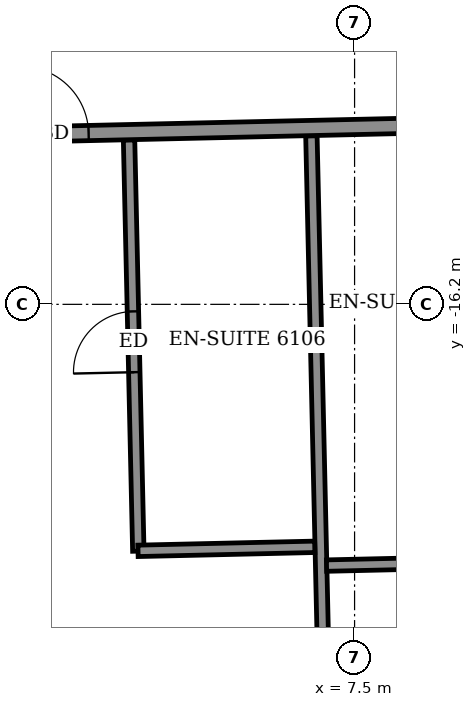
"""IFC4 building model, lengths in metres.
Left out: names, types, materials, properties, quantities, classifications, styles, units other than length and angle.
Written with IfcOpenShell. Run it as: python <this file> out.ifc"""

import sys

from ifc_helpers import new_model, si_unit, direction, frame, frame_2d, origin, place, context, subcontext, project, spatial, rectangle, extrude, element, fill, save


model = new_model("IFC4")
c1 = context("Model", 3, precision=1e-05, world=origin(), true_north=direction((0.0, 1.0)))
c2 = subcontext(c1, "Body", "Model", "MODEL_VIEW")
j1 = project(units=[si_unit("LENGTHUNIT", "METRE"), si_unit("PLANEANGLEUNIT", "RADIAN")], contexts=[c1])
p1 = place(None, origin())
s1 = spatial("IfcSite", under=j1, at=p1, CompositionType="ELEMENT")
p2 = place(p1, origin())
s2 = spatial("IfcBuilding", under=s1, at=p2, CompositionType="ELEMENT")
p3 = place(p2, frame((0.0, 0.0, 241.9)))
s3 = spatial("IfcBuildingStorey", under=s2, at=p3, CompositionType="ELEMENT", Elevation=241.9)
p4 = place(p3, frame((7.19, -25.357, 0.0), z_axis=(0.0, 0.0, 1.0), x_axis=(-0.022684355347, 0.999742676904, 0.0)))
e1 = element("IfcWall", 1, at=p4, inside=s3, PredefinedType="PARTITIONING", context=c2, shape_type="SweptSolid", body=[
    extrude(rectangle(XDim=11.376, YDim=0.15, at=frame_2d((5.688, 0.0))), origin(), (0.0, 0.0, 1.0), 2.5),
])
p5 = place(p3, frame((7.131, -19.637, 0.0), z_axis=(0.0, 0.0, 1.0), x_axis=(0.999740478815, 0.022781023197, 0.0)))
e2 = element("IfcWall", 2, at=p5, inside=s3, PredefinedType="PARTITIONING", context=c2, shape_type="SweptSolid", body=[
    extrude(rectangle(XDim=2.325, YDim=0.15, at=frame_2d((1.163, 0.0))), origin(), (0.0, 0.0, 1.0), 3.05),
])
p6 = place(p3, frame((4.655, -19.447, 0.0), z_axis=(0.0, 0.0, 1.0), x_axis=(-0.022562523897, 0.999745433856, 0.0)))
e3 = element("IfcWall", 3, at=p6, inside=s3, PredefinedType="PARTITIONING", context=c2, shape_type="SweptSolid", body=[
    extrude(rectangle(XDim=5.41, YDim=0.15, at=frame_2d((2.705, 0.0))), origin(), (0.0, 0.0, 1.0), 3.05),
])
p7 = place(p6, frame((2.355, 0.0, 0.0)))
e4 = element("IfcOpeningElement", 4, at=p7, cuts=e3, PredefinedType="OPENING", context=c2, shape_type="SweptSolid", body=[
    extrude(rectangle(XDim=0.8, YDim=2.1, at=frame_2d((0.4, 1.05))), frame((0.0, 0.085, 0.0), z_axis=(0.0, -1.0, 0.0), x_axis=(1.0, 0.0, 0.0)), (0.0, 0.0, 1.0), 0.17),
])
p8 = place(p3, frame((4.651, -19.443, 0.0), z_axis=(0.0, 0.0, 1.0), x_axis=(0.999738137323, 0.022883548292, 0.0)))
e5 = element("IfcWall", 5, at=p8, inside=s3, PredefinedType="PARTITIONING", context=c2, shape_type="SweptSolid", body=[
    extrude(rectangle(XDim=2.326, YDim=0.15, at=frame_2d((1.163, 0.0))), origin(), (0.0, 0.0, 1.0), 3.05),
])
p9 = place(p3, frame((-27.016, -14.65, 0.0), z_axis=(0.0, 0.0, 1.0), x_axis=(0.999742874861, 0.022675629315, 0.0)))
e6 = element("IfcWall", 6, at=p9, inside=s3, PredefinedType="PARTITIONING", context=c2, shape_type="SweptSolid", body=[
    extrude(rectangle(XDim=50.883, YDim=0.2, at=frame_2d((25.442, 0.0))), origin(), (0.0, 0.0, 1.0), 3.05),
])
p10 = place(p9, frame((1.575, 0.0, 0.0)))
e7 = element("IfcOpeningElement", 7, at=p10, cuts=e6, PredefinedType="OPENING", context=c2, shape_type="SweptSolid", body=[
    extrude(rectangle(XDim=1.0, YDim=2.1, at=frame_2d((0.5, 1.05))), frame((0.0, 0.11, 0.0), z_axis=(0.0, -1.0, 0.0), x_axis=(1.0, 0.0, 0.0)), (0.0, 0.0, 1.0), 0.22),
])
p11 = place(p9, frame((6.4, 0.0, 0.0)))
e8 = element("IfcOpeningElement", 8, at=p11, cuts=e6, PredefinedType="OPENING", context=c2, shape_type="SweptSolid", body=[
    extrude(rectangle(XDim=0.9, YDim=2.1, at=frame_2d((0.45, 1.05))), frame((0.0, 0.11, 0.0), z_axis=(0.0, -1.0, 0.0), x_axis=(1.0, 0.0, 0.0)), (0.0, 0.0, 1.0), 0.22),
])
p12 = place(p9, frame((11.025, 0.0, 0.0)))
e9 = element("IfcOpeningElement", 9, at=p12, cuts=e6, PredefinedType="OPENING", context=c2, shape_type="SweptSolid", body=[
    extrude(rectangle(XDim=0.9, YDim=2.1, at=frame_2d((0.45, 1.05))), frame((0.0, 0.11, 0.0), z_axis=(0.0, -1.0, 0.0), x_axis=(1.0, 0.0, 0.0)), (0.0, 0.0, 1.0), 0.22),
])
p13 = place(p9, frame((12.925, 0.0, 0.0)))
e10 = element("IfcOpeningElement", 10, at=p13, cuts=e6, PredefinedType="OPENING", context=c2, shape_type="SweptSolid", body=[
    extrude(rectangle(XDim=0.9, YDim=2.1, at=frame_2d((0.45, 1.05))), frame((0.0, 0.11, 0.0), z_axis=(0.0, -1.0, 0.0), x_axis=(1.0, 0.0, 0.0)), (0.0, 0.0, 1.0), 0.22),
])
p14 = place(p9, frame((19.65, 0.0, 0.0)))
e11 = element("IfcOpeningElement", 11, at=p14, cuts=e6, PredefinedType="OPENING", context=c2, shape_type="SweptSolid", body=[
    extrude(rectangle(XDim=0.9, YDim=2.1, at=frame_2d((0.45, 1.05))), frame((0.0, 0.11, 0.0), z_axis=(0.0, -1.0, 0.0), x_axis=(1.0, 0.0, 0.0)), (0.0, 0.0, 1.0), 0.22),
])
p15 = place(p9, frame((21.575, 0.0, 0.0)))
e12 = element("IfcOpeningElement", 12, at=p15, cuts=e6, PredefinedType="OPENING", context=c2, shape_type="SweptSolid", body=[
    extrude(rectangle(XDim=0.9, YDim=2.1, at=frame_2d((0.45, 1.05))), frame((0.0, 0.11, 0.0), z_axis=(0.0, -1.0, 0.0), x_axis=(1.0, 0.0, 0.0)), (0.0, 0.0, 1.0), 0.22),
])
p16 = place(p9, frame((28.25, 0.0, 0.0)))
e13 = element("IfcOpeningElement", 13, at=p16, cuts=e6, PredefinedType="OPENING", context=c2, shape_type="SweptSolid", body=[
    extrude(rectangle(XDim=0.9, YDim=2.1, at=frame_2d((0.45, 1.05))), frame((0.0, 0.11, 0.0), z_axis=(0.0, -1.0, 0.0), x_axis=(1.0, 0.0, 0.0)), (0.0, 0.0, 1.0), 0.22),
])
p17 = place(p9, frame((30.125, 0.0, 0.0)))
e14 = element("IfcOpeningElement", 14, at=p17, cuts=e6, PredefinedType="OPENING", context=c2, shape_type="SweptSolid", body=[
    extrude(rectangle(XDim=0.9, YDim=2.1, at=frame_2d((0.45, 1.05))), frame((0.0, 0.11, 0.0), z_axis=(0.0, -1.0, 0.0), x_axis=(1.0, 0.0, 0.0)), (0.0, 0.0, 1.0), 0.22),
])
p18 = place(p9, frame((36.9, 0.0, 0.0)))
e15 = element("IfcOpeningElement", 15, at=p18, cuts=e6, PredefinedType="OPENING", context=c2, shape_type="SweptSolid", body=[
    extrude(rectangle(XDim=0.9, YDim=2.1, at=frame_2d((0.45, 1.05))), frame((0.0, 0.11, 0.0), z_axis=(0.0, -1.0, 0.0), x_axis=(1.0, 0.0, 0.0)), (0.0, 0.0, 1.0), 0.22),
])
p19 = place(p9, frame((38.85, 0.0, 0.0)))
e16 = element("IfcOpeningElement", 16, at=p19, cuts=e6, PredefinedType="OPENING", context=c2, shape_type="SweptSolid", body=[
    extrude(rectangle(XDim=0.9, YDim=2.1, at=frame_2d((0.45, 1.05))), frame((0.0, 0.11, 0.0), z_axis=(0.0, -1.0, 0.0), x_axis=(1.0, 0.0, 0.0)), (0.0, 0.0, 1.0), 0.22),
])
p20 = place(p9, frame((48.629, 0.0, 0.0)))
e17 = element("IfcOpeningElement", 17, at=p20, cuts=e6, PredefinedType="OPENING", context=c2, shape_type="SweptSolid", body=[
    extrude(rectangle(XDim=1.0, YDim=2.1, at=frame_2d((0.5, 1.05))), frame((0.0, 0.11, 0.0), z_axis=(0.0, -1.0, 0.0), x_axis=(1.0, 0.0, 0.0)), (0.0, 0.0, 1.0), 0.22),
])
p21 = place(p9, frame((43.6, 0.0, 0.0)))
e18 = element("IfcOpeningElement", 18, at=p21, cuts=e6, PredefinedType="OPENING", context=c2, shape_type="SweptSolid", body=[
    extrude(rectangle(XDim=0.9, YDim=2.1, at=frame_2d((0.45, 1.05))), frame((0.0, 0.11, 0.0), z_axis=(0.0, -1.0, 0.0), x_axis=(1.0, 0.0, 0.0)), (0.0, 0.0, 1.0), 0.22),
])
p22 = place(p17, origin())
e19 = element("IfcDoor", 19, at=p22, inside=s3, OperationType="SINGLE_SWING_RIGHT", PredefinedType="DOOR", context=c2, shape_type="SweptSolid", body=[
    extrude(rectangle(XDim=0.9, YDim=2.1, at=frame_2d((0.45, 1.05))), frame((0.0, 0.025, 0.0), z_axis=(0.0, -1.0, 0.0), x_axis=(1.0, 0.0, 0.0)), (0.0, 0.0, 1.0), 0.05),
])
fill(e14, e19)
p23 = place(p7, origin())
e20 = element("IfcDoor", 20, at=p23, inside=s3, OperationType="SINGLE_SWING_RIGHT", PredefinedType="DOOR", context=c2, shape_type="SweptSolid", body=[
    extrude(rectangle(XDim=0.8, YDim=2.1, at=frame_2d((0.4, 1.05))), frame((0.0, 0.025, 0.0), z_axis=(0.0, -1.0, 0.0), x_axis=(1.0, 0.0, 0.0)), (0.0, 0.0, 1.0), 0.05),
])
fill(e4, e20)
save(model, sys.argv[1])
